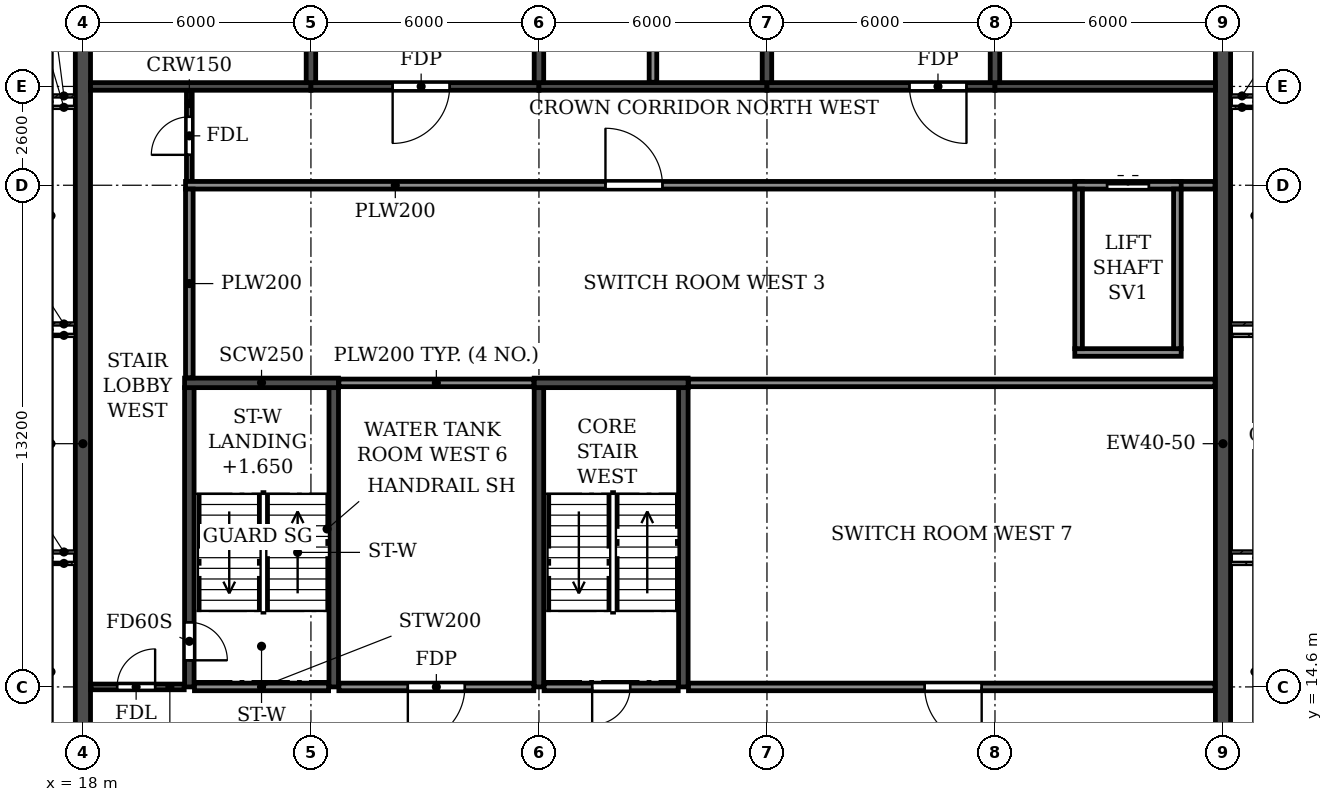
"""IFC4 building model, lengths in metres.
Left out: names, types, materials, properties, quantities, classifications, styles, units other than length and angle.
Written with IfcOpenShell. Run it as: python <this file> out.ifc"""

import sys

from ifc_helpers import new_model, si_unit, direction, frame, frame_2d, origin, place, context, subcontext, project, spatial, rectangle, extrude, element, fill, save


model = new_model("IFC4")
c1 = context("Model", 3, precision=1e-05, world=origin(), true_north=direction((0.0, 1.0)))
c2 = subcontext(c1, "Body", "Model", "MODEL_VIEW")
j1 = project(units=[si_unit("LENGTHUNIT", "METRE"), si_unit("PLANEANGLEUNIT", "RADIAN")], contexts=[c1])
p1 = place(None, origin())
s1 = spatial("IfcSite", under=j1, at=p1, CompositionType="ELEMENT")
p2 = place(p1, origin())
s2 = spatial("IfcBuilding", under=s1, at=p2, CompositionType="ELEMENT")
p3 = place(p2, frame((0.0, 0.0, 275.7)))
s3 = spatial("IfcBuildingStorey", under=s2, at=p3, CompositionType="ELEMENT", Elevation=275.7)
for number, where, z_axis, x_axis in (
    (1, (24.0, 30.5, 0.0), (0.0, 0.0, 1.0), (0.0, 1.0, 0.0)),
    (2, (30.0, 30.5, 0.0), (0.0, 0.0, 1.0), (0.0, 1.0, 0.0)),
    (3, (36.0, 30.5, 0.0), (0.0, 0.0, 1.0), (0.0, 1.0, 0.0)),
    (4, (42.0, 30.5, 0.0), (0.0, 0.0, 1.0), (0.0, 1.0, 0.0)),
):
    element("IfcWall", number, at=place(p3, frame(where, z_axis=z_axis, x_axis=x_axis)), inside=s3, PredefinedType="SHEAR", context=c2, shape_type="SweptSolid", body=[
        extrude(rectangle(XDim=10.5, YDim=0.25, at=frame_2d((5.25, 0.0))), origin(), (0.0, 0.0, 1.0), 3.05),
    ])
p4 = place(p3, frame((18.0, 4.683, 0.0), z_axis=(0.0, 0.0, 1.0), x_axis=(0.0, 1.0, 0.0)))
e5 = element("IfcWall", 5, at=p4, inside=s3, PredefinedType="SHEAR", context=c2, shape_type="SweptSolid", body=[
    extrude(rectangle(XDim=31.834, YDim=0.4, at=frame_2d((15.917, 0.0))), origin(), (0.0, 0.0, 1.0), 3.05),
])
p5 = place(p3, frame((48.0, 0.2, 0.0), z_axis=(0.0, 0.0, 1.0), x_axis=(0.0, 1.0, 0.0)))
e6 = element("IfcWall", 6, at=p5, inside=s3, PredefinedType="SHEAR", context=c2, shape_type="SweptSolid", body=[
    extrude(rectangle(XDim=40.8, YDim=0.4, at=frame_2d((20.4, 0.0))), origin(), (0.0, 0.0, 1.0), 3.05),
])
p6 = place(p3, frame((18.2, 30.4, 0.0), z_axis=(0.0, 0.0, 1.0), x_axis=(1.0, 0.0, 0.0)))
e7 = element("IfcWall", 7, at=p6, inside=s3, PredefinedType="SHEAR", context=c2, shape_type="SweptSolid", body=[
    extrude(rectangle(XDim=5.8, YDim=0.2, at=frame_2d((2.9, 0.0))), origin(), (0.0, 0.0, 1.0), 2.45),
])
p7 = place(p3, frame((24.0, 30.4, 0.0), z_axis=(0.0, 0.0, 1.0), x_axis=(1.0, 0.0, 0.0)))
e8 = element("IfcWall", 8, at=p7, inside=s3, PredefinedType="SHEAR", context=c2, shape_type="SweptSolid", body=[
    extrude(rectangle(XDim=6.0, YDim=0.2, at=frame_2d((3.0, 0.0))), origin(), (0.0, 0.0, 1.0), 2.45),
])
p8 = place(p7, frame((2.15, 0.0, 0.0)))
e9 = element("IfcOpeningElement", 9, at=p8, cuts=e8, PredefinedType="OPENING", context=c2, shape_type="SweptSolid", body=[
    extrude(rectangle(XDim=1.5, YDim=2.1, at=frame_2d((0.75, 1.05))), frame((0.0, 0.11, 0.0), z_axis=(0.0, -1.0, 0.0), x_axis=(1.0, 0.0, 0.0)), (0.0, 0.0, 1.0), 0.22),
])
p9 = place(p3, frame((30.0, 30.4, 0.0), z_axis=(0.0, 0.0, 1.0), x_axis=(1.0, 0.0, 0.0)))
e10 = element("IfcWall", 10, at=p9, inside=s3, PredefinedType="SHEAR", context=c2, shape_type="SweptSolid", body=[
    extrude(rectangle(XDim=6.0, YDim=0.2, at=frame_2d((3.0, 0.0))), origin(), (0.0, 0.0, 1.0), 2.45),
])
p10 = place(p3, frame((36.0, 30.4, 0.0), z_axis=(0.0, 0.0, 1.0), x_axis=(1.0, 0.0, 0.0)))
e11 = element("IfcWall", 11, at=p10, inside=s3, PredefinedType="SHEAR", context=c2, shape_type="SweptSolid", body=[
    extrude(rectangle(XDim=6.0, YDim=0.2, at=frame_2d((3.0, 0.0))), origin(), (0.0, 0.0, 1.0), 2.45),
])
p11 = place(p10, frame((3.75, 0.0, 0.0)))
e12 = element("IfcOpeningElement", 12, at=p11, cuts=e11, PredefinedType="OPENING", context=c2, shape_type="SweptSolid", body=[
    extrude(rectangle(XDim=1.5, YDim=2.1, at=frame_2d((0.75, 1.05))), frame((0.0, 0.11, 0.0), z_axis=(0.0, -1.0, 0.0), x_axis=(1.0, 0.0, 0.0)), (0.0, 0.0, 1.0), 0.22),
])
p12 = place(p3, frame((42.0, 30.4, 0.0), z_axis=(0.0, 0.0, 1.0), x_axis=(1.0, 0.0, 0.0)))
e13 = element("IfcWall", 13, at=p12, inside=s3, PredefinedType="SHEAR", context=c2, shape_type="SweptSolid", body=[
    extrude(rectangle(XDim=5.8, YDim=0.2, at=frame_2d((2.9, 0.0))), origin(), (0.0, 0.0, 1.0), 2.45),
])
p13 = place(p3, frame((20.8, 14.6, 0.0), z_axis=(0.0, 0.0, 1.0), x_axis=(0.0, 1.0, 0.0)))
e14 = element("IfcWall", 14, at=p13, inside=s3, PredefinedType="SOLIDWALL", context=c2, shape_type="SweptSolid", body=[
    extrude(rectangle(XDim=7.875, YDim=0.25, at=frame_2d((3.938, 0.0))), origin(), (0.0, 0.0, 1.0), 3.05),
])
p14 = place(p13, frame((0.7, 0.0, 0.0)))
e15 = element("IfcOpeningElement", 15, at=p14, cuts=e14, PredefinedType="OPENING", context=c2, shape_type="SweptSolid", body=[
    extrude(rectangle(XDim=1.0, YDim=2.1, at=frame_2d((0.5, 1.05))), frame((0.0, 0.135, 0.0), z_axis=(0.0, -1.0, 0.0), x_axis=(1.0, 0.0, 0.0)), (0.0, 0.0, 1.0), 0.27),
])
p15 = place(p3, frame((24.6, 14.6, 0.0), z_axis=(0.0, 0.0, 1.0), x_axis=(0.0, 1.0, 0.0)))
e16 = element("IfcWall", 16, at=p15, inside=s3, PredefinedType="SOLIDWALL", context=c2, shape_type="SweptSolid", body=[
    extrude(rectangle(XDim=7.875, YDim=0.25, at=frame_2d((3.938, 0.0))), origin(), (0.0, 0.0, 1.0), 3.05),
])
p16 = place(p3, frame((20.675, 22.6, 0.0), z_axis=(0.0, 0.0, 1.0), x_axis=(1.0, 0.0, 0.0)))
e17 = element("IfcWall", 17, at=p16, inside=s3, PredefinedType="SOLIDWALL", context=c2, shape_type="SweptSolid", body=[
    extrude(rectangle(XDim=4.05, YDim=0.25, at=frame_2d((2.025, 0.0))), origin(), (0.0, 0.0, 1.0), 3.05),
])
for number, where, z_axis, x_axis in (
    (18, (30.0, 14.6, 0.0), (0.0, 0.0, 1.0), (0.0, 1.0, 0.0)),
    (19, (33.8, 14.6, 0.0), (0.0, 0.0, 1.0), (0.0, 1.0, 0.0)),
):
    element("IfcWall", number, at=place(p3, frame(where, z_axis=z_axis, x_axis=x_axis)), inside=s3, PredefinedType="SOLIDWALL", context=c2, shape_type="SweptSolid", body=[
        extrude(rectangle(XDim=7.875, YDim=0.25, at=frame_2d((3.938, 0.0))), origin(), (0.0, 0.0, 1.0), 3.05),
    ])
p17 = place(p3, frame((29.875, 22.6, 0.0), z_axis=(0.0, 0.0, 1.0), x_axis=(1.0, 0.0, 0.0)))
e20 = element("IfcWall", 20, at=p17, inside=s3, PredefinedType="SOLIDWALL", context=c2, shape_type="SweptSolid", body=[
    extrude(rectangle(XDim=4.05, YDim=0.25, at=frame_2d((2.025, 0.0))), origin(), (0.0, 0.0, 1.0), 3.05),
])
p18 = place(p3, frame((18.21, 14.6, 0.0), z_axis=(0.0, 0.0, 1.0), x_axis=(1.0, 0.0, 0.0)))
e21 = element("IfcWall", 21, at=p18, inside=s3, PredefinedType="PARTITIONING", context=c2, shape_type="SweptSolid", body=[
    extrude(rectangle(XDim=2.455, YDim=0.15, at=frame_2d((1.228, 0.0))), origin(), (0.0, 0.0, 1.0), 3.05),
])
p19 = place(p18, frame((0.69, 0.0, 0.0)))
e22 = element("IfcOpeningElement", 22, at=p19, cuts=e21, PredefinedType="OPENING", context=c2, shape_type="SweptSolid", body=[
    extrude(rectangle(XDim=1.0, YDim=2.1, at=frame_2d((0.5, 1.05))), frame((0.0, 0.085, 0.0), z_axis=(0.0, -1.0, 0.0), x_axis=(1.0, 0.0, 0.0)), (0.0, 0.0, 1.0), 0.17),
])
p20 = place(p3, frame((20.8, 27.9, 0.0), z_axis=(0.0, 0.0, 1.0), x_axis=(0.0, 1.0, 0.0)))
e23 = element("IfcWall", 23, at=p20, inside=s3, PredefinedType="PARTITIONING", context=c2, shape_type="SweptSolid", body=[
    extrude(rectangle(XDim=2.39, YDim=0.15, at=frame_2d((1.195, 0.0))), origin(), (0.0, 0.0, 1.0), 3.05),
])
p21 = place(p20, frame((0.7, 0.0, 0.0)))
e24 = element("IfcOpeningElement", 24, at=p21, cuts=e23, PredefinedType="OPENING", context=c2, shape_type="SweptSolid", body=[
    extrude(rectangle(XDim=1.0, YDim=2.1, at=frame_2d((0.5, 1.05))), frame((0.0, 0.085, 0.0), z_axis=(0.0, -1.0, 0.0), x_axis=(1.0, 0.0, 0.0)), (0.0, 0.0, 1.0), 0.17),
])
p22 = place(p3, frame((24.735, 14.6, 0.0), z_axis=(0.0, 0.0, 1.0), x_axis=(1.0, 0.0, 0.0)))
e25 = element("IfcWall", 25, at=p22, inside=s3, PredefinedType="PARTITIONING", context=c2, shape_type="SweptSolid", body=[
    extrude(rectangle(XDim=5.13, YDim=0.2, at=frame_2d((2.565, 0.0))), origin(), (0.0, 0.0, 1.0), 3.05),
])
p23 = place(p22, frame((1.815, 0.0, 0.0)))
e26 = element("IfcOpeningElement", 26, at=p23, cuts=e25, PredefinedType="OPENING", context=c2, shape_type="SweptSolid", body=[
    extrude(rectangle(XDim=1.5, YDim=2.1, at=frame_2d((0.75, 1.05))), frame((0.0, 0.11, 0.0), z_axis=(0.0, -1.0, 0.0), x_axis=(1.0, 0.0, 0.0)), (0.0, 0.0, 1.0), 0.22),
])
p24 = place(p3, frame((33.935, 14.6, 0.0), z_axis=(0.0, 0.0, 1.0), x_axis=(1.0, 0.0, 0.0)))
e27 = element("IfcWall", 27, at=p24, inside=s3, PredefinedType="PARTITIONING", context=c2, shape_type="SweptSolid", body=[
    extrude(rectangle(XDim=13.855, YDim=0.2, at=frame_2d((6.927, 0.0))), origin(), (0.0, 0.0, 1.0), 3.05),
])
p25 = place(p24, frame((6.215, 0.0, 0.0)))
e28 = element("IfcOpeningElement", 28, at=p25, cuts=e27, PredefinedType="OPENING", context=c2, shape_type="SweptSolid", body=[
    extrude(rectangle(XDim=1.5, YDim=2.1, at=frame_2d((0.75, 1.05))), frame((0.0, 0.11, 0.0), z_axis=(0.0, -1.0, 0.0), x_axis=(1.0, 0.0, 0.0)), (0.0, 0.0, 1.0), 0.22),
])
p26 = place(p3, frame((24.735, 22.6, 0.0), z_axis=(0.0, 0.0, 1.0), x_axis=(1.0, 0.0, 0.0)))
e29 = element("IfcWall", 29, at=p26, inside=s3, PredefinedType="PARTITIONING", context=c2, shape_type="SweptSolid", body=[
    extrude(rectangle(XDim=5.13, YDim=0.2, at=frame_2d((2.565, 0.0))), origin(), (0.0, 0.0, 1.0), 3.05),
])
p27 = place(p3, frame((33.935, 22.6, 0.0), z_axis=(0.0, 0.0, 1.0), x_axis=(1.0, 0.0, 0.0)))
e30 = element("IfcWall", 30, at=p27, inside=s3, PredefinedType="PARTITIONING", context=c2, shape_type="SweptSolid", body=[
    extrude(rectangle(XDim=13.855, YDim=0.2, at=frame_2d((6.927, 0.0))), origin(), (0.0, 0.0, 1.0), 3.05),
])
p28 = place(p3, frame((20.7, 27.8, 0.0), z_axis=(0.0, 0.0, 1.0), x_axis=(1.0, 0.0, 0.0)))
e31 = element("IfcWall", 31, at=p28, inside=s3, PredefinedType="PARTITIONING", context=c2, shape_type="SweptSolid", body=[
    extrude(rectangle(XDim=23.6, YDim=0.2, at=frame_2d((11.8, 0.0))), origin(), (0.0, 0.0, 1.0), 3.05),
])
p29 = place(p28, frame((11.05, 0.0, 0.0)))
e32 = element("IfcOpeningElement", 32, at=p29, cuts=e31, PredefinedType="OPENING", context=c2, shape_type="SweptSolid", body=[
    extrude(rectangle(XDim=1.5, YDim=2.1, at=frame_2d((0.75, 1.05))), frame((0.0, 0.11, 0.0), z_axis=(0.0, -1.0, 0.0), x_axis=(1.0, 0.0, 0.0)), (0.0, 0.0, 1.0), 0.22),
])
p30 = place(p3, frame((46.7, 27.8, 0.0), z_axis=(0.0, 0.0, 1.0), x_axis=(1.0, 0.0, 0.0)))
e33 = element("IfcWall", 33, at=p30, inside=s3, PredefinedType="PARTITIONING", context=c2, shape_type="SweptSolid", body=[
    extrude(rectangle(XDim=1.09, YDim=0.2, at=frame_2d((0.545, 0.0))), origin(), (0.0, 0.0, 1.0), 3.05),
])
p31 = place(p3, frame((20.8, 22.735, 0.0), z_axis=(0.0, 0.0, 1.0), x_axis=(0.0, 1.0, 0.0)))
e34 = element("IfcWall", 34, at=p31, inside=s3, PredefinedType="PARTITIONING", context=c2, shape_type="SweptSolid", body=[
    extrude(rectangle(XDim=4.965, YDim=0.2, at=frame_2d((2.482, 0.0))), origin(), (0.0, 0.0, 1.0), 3.05),
])
p32 = place(p3, frame((33.0, 30.51, 0.0), z_axis=(0.0, 0.0, 1.0), x_axis=(0.0, 1.0, 0.0)))
e35 = element("IfcWall", 35, at=p32, inside=s3, PredefinedType="PARTITIONING", context=c2, shape_type="SweptSolid", body=[
    extrude(rectangle(XDim=10.63, YDim=0.2, at=frame_2d((5.315, 0.0))), origin(), (0.0, 0.0, 1.0), 3.05),
])
p33 = place(p3, frame((44.1, 23.4, 0.0), z_axis=(0.0, 0.0, 1.0), x_axis=(1.0, 0.0, 0.0)))
e36 = element("IfcWall", 36, at=p33, inside=s3, PredefinedType="PARTITIONING", context=c2, shape_type="SweptSolid", body=[
    extrude(rectangle(XDim=2.8, YDim=0.2, at=frame_2d((1.4, 0.0))), origin(), (0.0, 0.0, 1.0), 3.05),
])
p34 = place(p3, frame((44.1, 27.8, 0.0), z_axis=(0.0, 0.0, 1.0), x_axis=(1.0, 0.0, 0.0)))
e37 = element("IfcWall", 37, at=p34, inside=s3, PredefinedType="PARTITIONING", context=c2, shape_type="SweptSolid", body=[
    extrude(rectangle(XDim=2.8, YDim=0.2, at=frame_2d((1.4, 0.0))), origin(), (0.0, 0.0, 1.0), 3.05),
])
p35 = place(p34, frame((0.85, 0.0, 0.0)))
e38 = element("IfcOpeningElement", 38, at=p35, cuts=e37, PredefinedType="OPENING", context=c2, shape_type="SweptSolid", body=[
    extrude(rectangle(XDim=1.1, YDim=2.1, at=frame_2d((0.55, 1.05))), frame((0.0, 0.11, 0.0), z_axis=(0.0, -1.0, 0.0), x_axis=(1.0, 0.0, 0.0)), (0.0, 0.0, 1.0), 0.22),
])
for number, where, z_axis, x_axis in (
    (39, (44.2, 23.5, 0.0), (0.0, 0.0, 1.0), (0.0, 1.0, 0.0)),
    (40, (46.8, 23.5, 0.0), (0.0, 0.0, 1.0), (0.0, 1.0, 0.0)),
):
    element("IfcWall", number, at=place(p3, frame(where, z_axis=z_axis, x_axis=x_axis)), inside=s3, PredefinedType="PARTITIONING", context=c2, shape_type="SweptSolid", body=[
        extrude(rectangle(XDim=4.2, YDim=0.2, at=frame_2d((2.1, 0.0))), origin(), (0.0, 0.0, 1.0), 3.05),
    ])
p36 = place(p3, frame((20.935, 14.6, 0.0), z_axis=(0.0, 0.0, 1.0), x_axis=(1.0, 0.0, 0.0)))
e41 = element("IfcWall", 41, at=p36, inside=s3, PredefinedType="PARTITIONING", context=c2, shape_type="SweptSolid", body=[
    extrude(rectangle(XDim=3.53, YDim=0.2, at=frame_2d((1.765, 0.0))), origin(), (0.0, 0.0, 1.0), 3.05),
])
p37 = place(p3, frame((30.135, 14.6, 0.0), z_axis=(0.0, 0.0, 1.0), x_axis=(1.0, 0.0, 0.0)))
e42 = element("IfcWall", 42, at=p37, inside=s3, PredefinedType="PARTITIONING", context=c2, shape_type="SweptSolid", body=[
    extrude(rectangle(XDim=3.53, YDim=0.2, at=frame_2d((1.765, 0.0))), origin(), (0.0, 0.0, 1.0), 3.05),
])
p38 = place(p37, frame((1.265, 0.0, 0.0)))
e43 = element("IfcOpeningElement", 43, at=p38, cuts=e42, PredefinedType="OPENING", context=c2, shape_type="SweptSolid", body=[
    extrude(rectangle(XDim=1.0, YDim=2.1, at=frame_2d((0.5, 1.05))), frame((0.0, 0.11, 0.0), z_axis=(0.0, -1.0, 0.0), x_axis=(1.0, 0.0, 0.0)), (0.0, 0.0, 1.0), 0.22),
])
p39 = place(p8, frame((1.5, 0.0, 0.0), z_axis=(0.0, 0.0, 1.0), x_axis=(-1.0, 0.0, 0.0)))
e44 = element("IfcDoor", 44, at=p39, inside=s3, OperationType="DOUBLE_DOOR_SINGLE_SWING", PredefinedType="DOOR", context=c2, shape_type="SweptSolid", body=[
    extrude(rectangle(XDim=1.5, YDim=2.1, at=frame_2d((0.75, 1.05))), frame((0.0, 0.025, 0.0), z_axis=(0.0, -1.0, 0.0), x_axis=(1.0, 0.0, 0.0)), (0.0, 0.0, 1.0), 0.05),
])
fill(e9, e44)
p40 = place(p29, origin())
e45 = element("IfcDoor", 45, at=p40, inside=s3, OperationType="DOUBLE_DOOR_SINGLE_SWING", PredefinedType="DOOR", context=c2, shape_type="SweptSolid", body=[
    extrude(rectangle(XDim=1.5, YDim=2.1, at=frame_2d((0.75, 1.05))), frame((0.0, 0.025, 0.0), z_axis=(0.0, -1.0, 0.0), x_axis=(1.0, 0.0, 0.0)), (0.0, 0.0, 1.0), 0.05),
])
fill(e32, e45)
p41 = place(p11, frame((1.5, 0.0, 0.0), z_axis=(0.0, 0.0, 1.0), x_axis=(-1.0, 0.0, 0.0)))
e46 = element("IfcDoor", 46, at=p41, inside=s3, OperationType="DOUBLE_DOOR_SINGLE_SWING", PredefinedType="DOOR", context=c2, shape_type="SweptSolid", body=[
    extrude(rectangle(XDim=1.5, YDim=2.1, at=frame_2d((0.75, 1.05))), frame((0.0, 0.025, 0.0), z_axis=(0.0, -1.0, 0.0), x_axis=(1.0, 0.0, 0.0)), (0.0, 0.0, 1.0), 0.05),
])
fill(e12, e46)
p42 = place(p35, origin())
e47 = element("IfcDoor", 47, at=p42, inside=s3, OperationType="DOUBLE_DOOR_SLIDING", PredefinedType="DOOR", context=c2, shape_type="SweptSolid", body=[
    extrude(rectangle(XDim=1.1, YDim=2.1, at=frame_2d((0.55, 1.05))), frame((0.0, 0.025, 0.0), z_axis=(0.0, -1.0, 0.0), x_axis=(1.0, 0.0, 0.0)), (0.0, 0.0, 1.0), 0.05),
])
fill(e38, e47)
p43 = place(p23, frame((1.5, 0.0, 0.0), z_axis=(0.0, 0.0, 1.0), x_axis=(-1.0, 0.0, 0.0)))
e48 = element("IfcDoor", 48, at=p43, inside=s3, OperationType="DOUBLE_DOOR_SINGLE_SWING", PredefinedType="DOOR", context=c2, shape_type="SweptSolid", body=[
    extrude(rectangle(XDim=1.5, YDim=2.1, at=frame_2d((0.75, 1.05))), frame((0.0, 0.025, 0.0), z_axis=(0.0, -1.0, 0.0), x_axis=(1.0, 0.0, 0.0)), (0.0, 0.0, 1.0), 0.05),
])
fill(e26, e48)
p44 = place(p25, frame((1.5, 0.0, 0.0), z_axis=(0.0, 0.0, 1.0), x_axis=(-1.0, 0.0, 0.0)))
e49 = element("IfcDoor", 49, at=p44, inside=s3, OperationType="DOUBLE_DOOR_SINGLE_SWING", PredefinedType="DOOR", context=c2, shape_type="SweptSolid", body=[
    extrude(rectangle(XDim=1.5, YDim=2.1, at=frame_2d((0.75, 1.05))), frame((0.0, 0.025, 0.0), z_axis=(0.0, -1.0, 0.0), x_axis=(1.0, 0.0, 0.0)), (0.0, 0.0, 1.0), 0.05),
])
fill(e28, e49)
p45 = place(p19, origin())
e50 = element("IfcDoor", 50, at=p45, inside=s3, OperationType="SINGLE_SWING_RIGHT", PredefinedType="DOOR", context=c2, shape_type="SweptSolid", body=[
    extrude(rectangle(XDim=1.0, YDim=2.1, at=frame_2d((0.5, 1.05))), frame((0.0, 0.025, 0.0), z_axis=(0.0, -1.0, 0.0), x_axis=(1.0, 0.0, 0.0)), (0.0, 0.0, 1.0), 0.05),
])
fill(e22, e50)
p46 = place(p14, frame((1.0, 0.0, 0.0), z_axis=(0.0, 0.0, 1.0), x_axis=(-1.0, 0.0, 0.0)))
e51 = element("IfcDoor", 51, at=p46, inside=s3, OperationType="SINGLE_SWING_RIGHT", PredefinedType="DOOR", context=c2, shape_type="SweptSolid", body=[
    extrude(rectangle(XDim=1.0, YDim=2.1, at=frame_2d((0.5, 1.05))), frame((0.0, 0.025, 0.0), z_axis=(0.0, -1.0, 0.0), x_axis=(1.0, 0.0, 0.0)), (0.0, 0.0, 1.0), 0.05),
])
fill(e15, e51)
p47 = place(p21, origin())
e52 = element("IfcDoor", 52, at=p47, inside=s3, OperationType="SINGLE_SWING_LEFT", PredefinedType="DOOR", context=c2, shape_type="SweptSolid", body=[
    extrude(rectangle(XDim=1.0, YDim=2.1, at=frame_2d((0.5, 1.05))), frame((0.0, 0.025, 0.0), z_axis=(0.0, -1.0, 0.0), x_axis=(1.0, 0.0, 0.0)), (0.0, 0.0, 1.0), 0.05),
])
fill(e24, e52)
p48 = place(p38, frame((1.0, 0.0, 0.0), z_axis=(0.0, 0.0, 1.0), x_axis=(-1.0, 0.0, 0.0)))
e53 = element("IfcDoor", 53, at=p48, inside=s3, OperationType="SINGLE_SWING_RIGHT", PredefinedType="DOOR", context=c2, shape_type="SweptSolid", body=[
    extrude(rectangle(XDim=1.0, YDim=2.1, at=frame_2d((0.5, 1.05))), frame((0.0, 0.025, 0.0), z_axis=(0.0, -1.0, 0.0), x_axis=(1.0, 0.0, 0.0)), (0.0, 0.0, 1.0), 0.05),
])
fill(e43, e53)
save(model, sys.argv[1])
